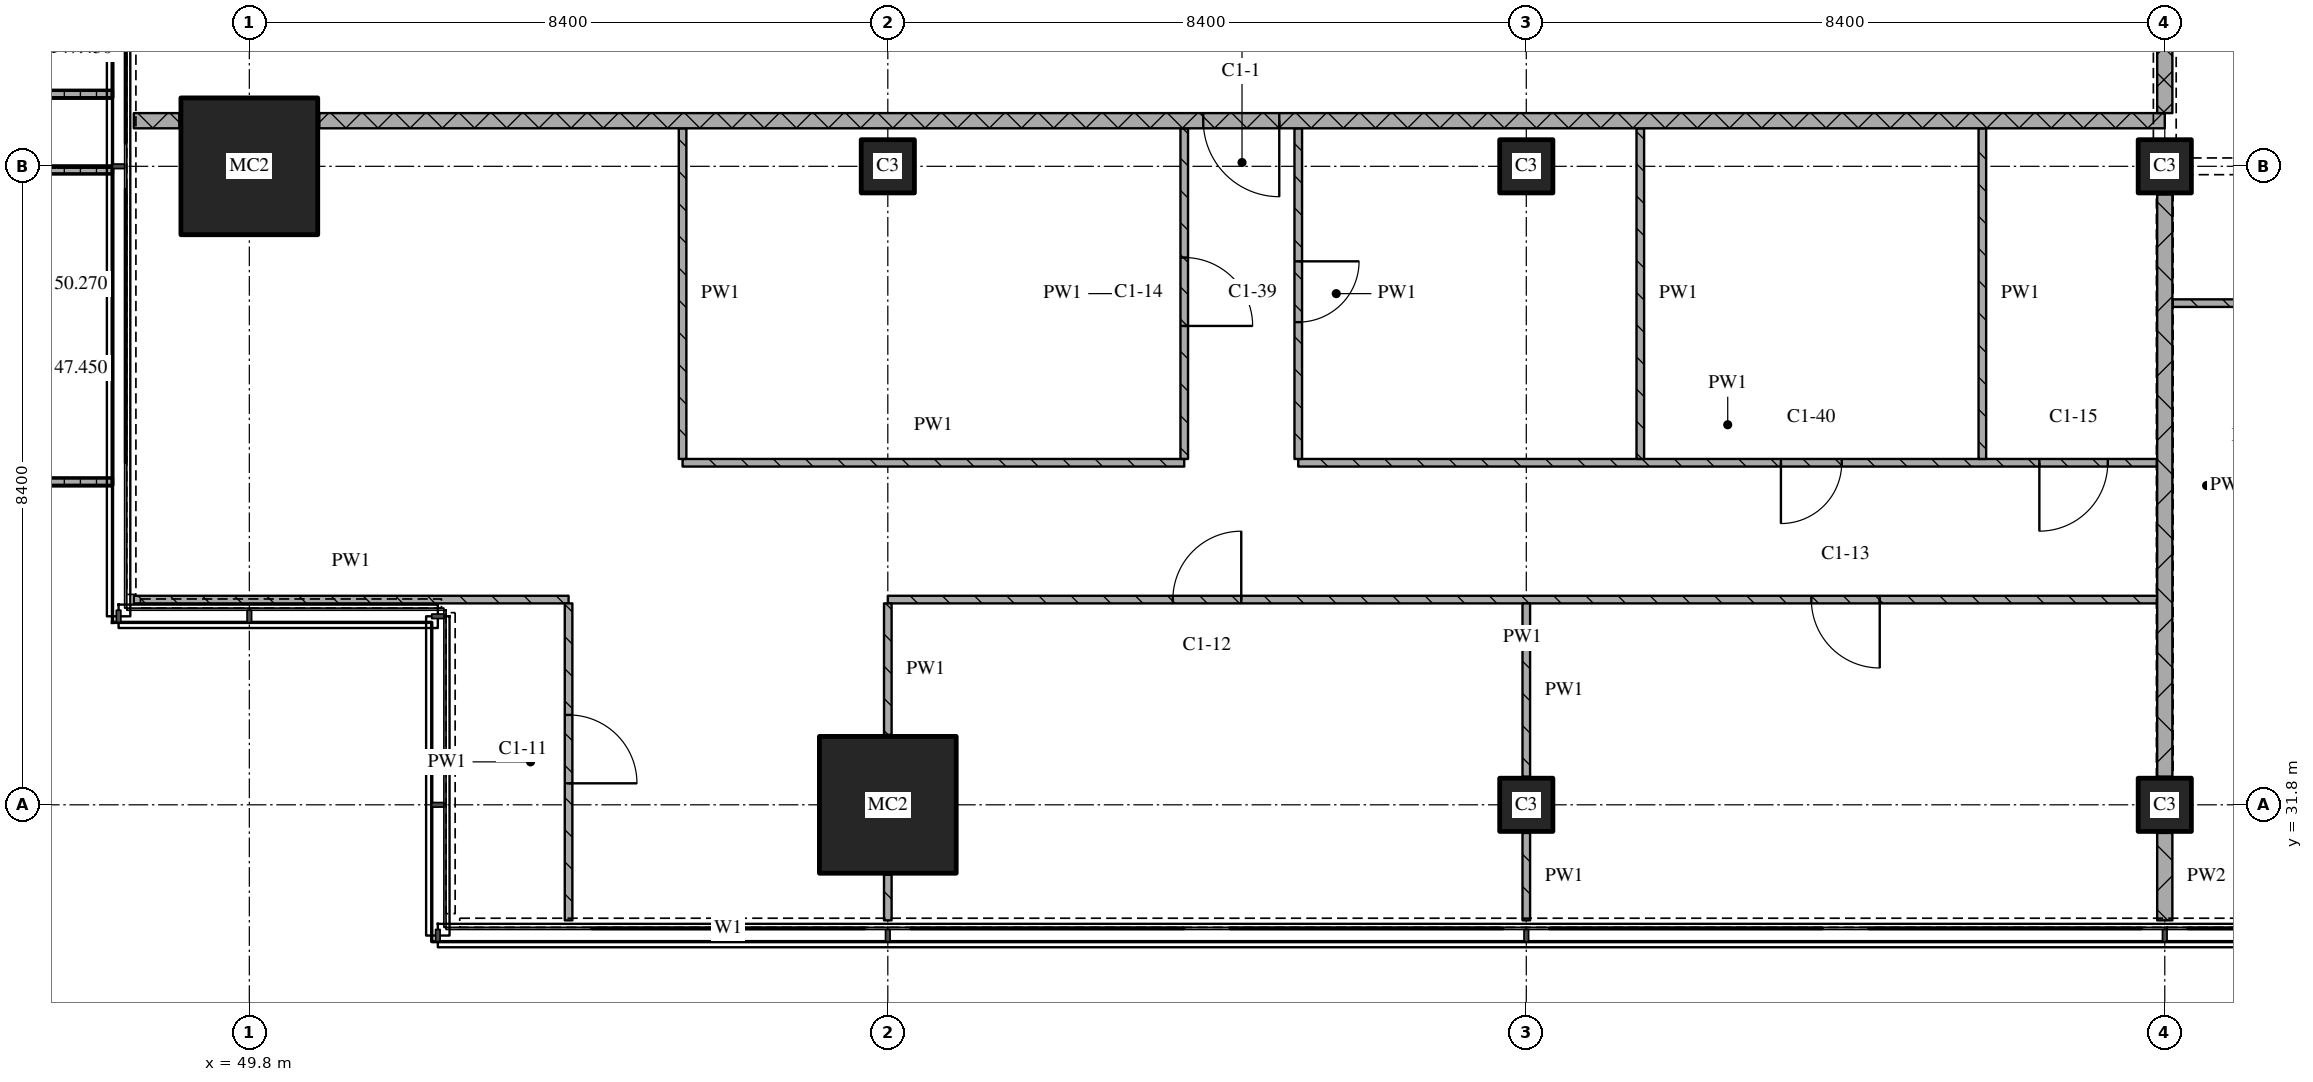
"""IFC4 building model, lengths in metres.
Left out: names, types, materials, properties, quantities, classifications, styles, units other than length and angle.
Written with IfcOpenShell. Run it as: python <this file> out.ifc"""

import sys

from ifc_helpers import new_model, si_unit, direction, frame, frame_2d, origin, origin_2d, place, context, subcontext, project, spatial, polyline, rectangle, outline, extrude, element, fill, save


model = new_model("IFC4")
c1 = context("Model", 3, precision=1e-05, world=origin(), true_north=direction((0.0, 1.0)))
c2 = subcontext(c1, "Body", "Model", "MODEL_VIEW")
j1 = project(units=[si_unit("LENGTHUNIT", "METRE"), si_unit("PLANEANGLEUNIT", "RADIAN")], contexts=[c1])
p1 = place(None, origin())
s1 = spatial("IfcSite", under=j1, at=p1, CompositionType="ELEMENT")
p2 = place(p1, origin())
s2 = spatial("IfcBuilding", under=s1, at=p2, CompositionType="ELEMENT")
p3 = place(p2, frame((0.0, 0.0, 147.45)))
s3 = spatial("IfcBuildingStorey", under=s2, at=p3, CompositionType="ELEMENT", Elevation=147.45)
for number, where, z_axis, x_axis in (
    (1, (49.8, 40.2, 0.0), (0.0, 0.0, 1.0), (1.0, 0.0, 0.0)),
    (2, (58.2, 31.8, 0.0), (0.0, 0.0, 1.0), (1.0, 0.0, 0.0)),
):
    element("IfcColumn", number, at=place(p3, frame(where, z_axis=z_axis, x_axis=x_axis)), inside=s3, PredefinedType="COLUMN", context=c2, shape_type="SweptSolid", body=[
        extrude(rectangle(XDim=1.8, YDim=1.8, at=origin_2d()), origin(), (0.0, 0.0, 1.0), 3.6),
    ])
for number, where, z_axis, x_axis in (
    (3, (58.2, 40.2, 0.0), (0.0, 0.0, 1.0), (1.0, 0.0, 0.0)),
    (4, (66.6, 31.8, 0.0), (0.0, 0.0, 1.0), (1.0, 0.0, 0.0)),
    (5, (66.6, 40.2, 0.0), (0.0, 0.0, 1.0), (1.0, 0.0, 0.0)),
    (6, (75.0, 31.8, 0.0), (0.0, 0.0, 1.0), (1.0, 0.0, 0.0)),
    (7, (75.0, 40.2, 0.0), (0.0, 0.0, 1.0), (1.0, 0.0, 0.0)),
):
    element("IfcColumn", number, at=place(p3, frame(where, z_axis=z_axis, x_axis=x_axis)), inside=s3, PredefinedType="COLUMN", context=c2, shape_type="SweptSolid", body=[
        extrude(rectangle(XDim=0.7, YDim=0.7, at=origin_2d()), origin(), (0.0, 0.0, 1.0), 3.6),
    ])
p4 = place(p3, origin())
e8 = element("IfcWall", 8, at=p4, inside=s3, PredefinedType="SOLIDWALL", context=c2, shape_type="SweptSolid", body=[
    extrude(outline(polyline([(48.0, 43.5), (48.0, 43.4), (46.5, 43.4), (46.5, 41.2), (48.0, 41.2), (48.0, 41.1), (46.4, 41.1), (46.4, 43.5), (48.0, 43.5)])), origin(), (0.0, 0.0, 1.0), 1.0),
])
p5 = place(p3, origin())
e9 = element("IfcWall", 9, at=p5, inside=s3, PredefinedType="SOLIDWALL", context=c2, shape_type="SweptSolid", body=[
    extrude(outline(polyline([(48.0, 40.2), (48.0, 40.1), (46.367, 40.1), (46.367, 36.1), (48.0, 36.1), (48.0, 36.0), (46.267, 36.0), (46.267, 40.2), (48.0, 40.2)])), origin(), (0.0, 0.0, 1.0), 1.0),
])
p6 = place(p3, frame((48.28, 34.5, 0.0), z_axis=(0.0, 0.0, 1.0), x_axis=(1.0, 0.0, 0.0)))
e10 = element("IfcWall", 10, at=p6, inside=s3, PredefinedType="PARTITIONING", context=c2, shape_type="SweptSolid", body=[
    extrude(rectangle(XDim=5.72, YDim=0.1, at=frame_2d((2.86, 0.0))), origin(), (0.0, 0.0, 1.0), 3.32),
])
p7 = place(p3, frame((74.9, 34.5, 0.0), z_axis=(0.0, 0.0, 1.0), x_axis=(-1.0, 0.0, 0.0)))
e11 = element("IfcWall", 11, at=p7, inside=s3, PredefinedType="PARTITIONING", context=c2, shape_type="SweptSolid", body=[
    extrude(rectangle(XDim=16.7, YDim=0.1, at=frame_2d((8.35, 0.0))), origin(), (0.0, 0.0, 1.0), 3.32),
])
p8 = place(p7, frame((3.65, 0.0, 0.0)))
e12 = element("IfcOpeningElement", 12, at=p8, cuts=e11, PredefinedType="OPENING", context=c2, shape_type="SweptSolid", body=[
    extrude(rectangle(XDim=0.9, YDim=2.1, at=frame_2d((0.45, 1.05))), frame((0.0, 0.06, 0.0), z_axis=(0.0, -1.0, 0.0), x_axis=(1.0, 0.0, 0.0)), (0.0, 0.0, 1.0), 0.12),
])
p9 = place(p7, frame((12.05, 0.0, 0.0)))
e13 = element("IfcOpeningElement", 13, at=p9, cuts=e11, PredefinedType="OPENING", context=c2, shape_type="SweptSolid", body=[
    extrude(rectangle(XDim=0.9, YDim=2.1, at=frame_2d((0.45, 1.05))), frame((0.0, 0.06, 0.0), z_axis=(0.0, -1.0, 0.0), x_axis=(1.0, 0.0, 0.0)), (0.0, 0.0, 1.0), 0.12),
])
p10 = place(p3, frame((55.5, 36.3, 0.0), z_axis=(0.0, 0.0, 1.0), x_axis=(1.0, 0.0, 0.0)))
e14 = element("IfcWall", 14, at=p10, inside=s3, PredefinedType="PARTITIONING", context=c2, shape_type="SweptSolid", body=[
    extrude(rectangle(XDim=6.6, YDim=0.1, at=frame_2d((3.3, 0.0))), origin(), (0.0, 0.0, 1.0), 3.32),
])
p11 = place(p3, frame((63.6, 36.3, 0.0), z_axis=(0.0, 0.0, 1.0), x_axis=(1.0, 0.0, 0.0)))
e15 = element("IfcWall", 15, at=p11, inside=s3, PredefinedType="PARTITIONING", context=c2, shape_type="SweptSolid", body=[
    extrude(rectangle(XDim=11.3, YDim=0.1, at=frame_2d((5.65, 0.0))), origin(), (0.0, 0.0, 1.0), 3.32),
])
p12 = place(p11, frame((6.35, 0.0, 0.0)))
e16 = element("IfcOpeningElement", 16, at=p12, cuts=e15, PredefinedType="OPENING", context=c2, shape_type="SweptSolid", body=[
    extrude(rectangle(XDim=0.8, YDim=2.1, at=frame_2d((0.4, 1.05))), frame((0.0, 0.06, 0.0), z_axis=(0.0, -1.0, 0.0), x_axis=(1.0, 0.0, 0.0)), (0.0, 0.0, 1.0), 0.12),
])
p13 = place(p11, frame((9.75, 0.0, 0.0)))
e17 = element("IfcOpeningElement", 17, at=p13, cuts=e15, PredefinedType="OPENING", context=c2, shape_type="SweptSolid", body=[
    extrude(rectangle(XDim=0.9, YDim=2.1, at=frame_2d((0.45, 1.05))), frame((0.0, 0.06, 0.0), z_axis=(0.0, -1.0, 0.0), x_axis=(1.0, 0.0, 0.0)), (0.0, 0.0, 1.0), 0.12),
])
p14 = place(p3, frame((75.1, 38.4, 0.0), z_axis=(0.0, 0.0, 1.0), x_axis=(1.0, 0.0, 0.0)))
e18 = element("IfcWall", 18, at=p14, inside=s3, PredefinedType="PARTITIONING", context=c2, shape_type="SweptSolid", body=[
    extrude(rectangle(XDim=2.9, YDim=0.1, at=frame_2d((1.45, 0.0))), origin(), (0.0, 0.0, 1.0), 3.32),
])
p15 = place(p14, frame((1.0, 0.0, 0.0)))
e19 = element("IfcOpeningElement", 19, at=p15, cuts=e18, PredefinedType="OPENING", context=c2, shape_type="SweptSolid", body=[
    extrude(rectangle(XDim=0.8, YDim=2.1, at=frame_2d((0.4, 1.05))), frame((0.0, 0.06, 0.0), z_axis=(0.0, -1.0, 0.0), x_axis=(1.0, 0.0, 0.0)), (0.0, 0.0, 1.0), 0.12),
])
p16 = place(p3, frame((48.28, 40.8, 0.0), z_axis=(0.0, 0.0, 1.0), x_axis=(1.0, 0.0, 0.0)))
e20 = element("IfcWall", 20, at=p16, inside=s3, PredefinedType="PARTITIONING", context=c2, shape_type="SweptSolid", body=[
    extrude(rectangle(XDim=0.6, YDim=0.2, at=frame_2d((0.3, 0.0))), origin(), (0.0, 0.0, 1.0), 3.32),
])
p17 = place(p3, frame((75.0, 40.8, 0.0), z_axis=(0.0, 0.0, 1.0), x_axis=(-1.0, 0.0, 0.0)))
e21 = element("IfcWall", 21, at=p17, inside=s3, PredefinedType="PARTITIONING", context=c2, shape_type="SweptSolid", body=[
    extrude(rectangle(XDim=24.28, YDim=0.2, at=frame_2d((12.14, 0.0))), origin(), (0.0, 0.0, 1.0), 3.32),
])
p18 = place(p17, frame((11.65, 0.0, 0.0)))
e22 = element("IfcOpeningElement", 22, at=p18, cuts=e21, PredefinedType="OPENING", context=c2, shape_type="SweptSolid", body=[
    extrude(rectangle(XDim=1.0, YDim=2.1, at=frame_2d((0.5, 1.05))), frame((0.0, 0.11, 0.0), z_axis=(0.0, -1.0, 0.0), x_axis=(1.0, 0.0, 0.0)), (0.0, 0.0, 1.0), 0.22),
])
p19 = place(p3, frame((54.0, 30.28, 0.0), z_axis=(0.0, 0.0, 1.0), x_axis=(0.0, 1.0, 0.0)))
e23 = element("IfcWall", 23, at=p19, inside=s3, PredefinedType="PARTITIONING", context=c2, shape_type="SweptSolid", body=[
    extrude(rectangle(XDim=4.17, YDim=0.1, at=frame_2d((2.085, 0.0))), origin(), (0.0, 0.0, 1.0), 3.32),
])
p20 = place(p19, frame((1.803, 0.0, 0.0)))
e24 = element("IfcOpeningElement", 24, at=p20, cuts=e23, PredefinedType="OPENING", context=c2, shape_type="SweptSolid", body=[
    extrude(rectangle(XDim=0.9, YDim=2.1, at=frame_2d((0.45, 1.05))), frame((0.0, 0.06, 0.0), z_axis=(0.0, -1.0, 0.0), x_axis=(1.0, 0.0, 0.0)), (0.0, 0.0, 1.0), 0.12),
])
p21 = place(p3, frame((55.5, 40.7, 0.0), z_axis=(0.0, 0.0, 1.0), x_axis=(0.0, -1.0, 0.0)))
e25 = element("IfcWall", 25, at=p21, inside=s3, PredefinedType="PARTITIONING", context=c2, shape_type="SweptSolid", body=[
    extrude(rectangle(XDim=4.35, YDim=0.1, at=frame_2d((2.175, 0.0))), origin(), (0.0, 0.0, 1.0), 3.32),
])
p22 = place(p3, frame((58.2, 30.88, 0.0), z_axis=(0.0, 0.0, 1.0), x_axis=(0.0, -1.0, 0.0)))
e26 = element("IfcWall", 26, at=p22, inside=s3, PredefinedType="PARTITIONING", context=c2, shape_type="SweptSolid", body=[
    extrude(rectangle(XDim=0.6, YDim=0.1, at=frame_2d((0.3, 0.0))), origin(), (0.0, 0.0, 1.0), 3.32),
])
p23 = place(p3, frame((58.2, 34.45, 0.0), z_axis=(0.0, 0.0, 1.0), x_axis=(0.0, -1.0, 0.0)))
e27 = element("IfcWall", 27, at=p23, inside=s3, PredefinedType="PARTITIONING", context=c2, shape_type="SweptSolid", body=[
    extrude(rectangle(XDim=1.73, YDim=0.1, at=frame_2d((0.865, 0.0))), origin(), (0.0, 0.0, 1.0), 3.32),
])
p24 = place(p3, frame((62.1, 36.35, 0.0), z_axis=(0.0, 0.0, 1.0), x_axis=(0.0, 1.0, 0.0)))
e28 = element("IfcWall", 28, at=p24, inside=s3, PredefinedType="PARTITIONING", context=c2, shape_type="SweptSolid", body=[
    extrude(rectangle(XDim=4.35, YDim=0.1, at=frame_2d((2.175, 0.0))), origin(), (0.0, 0.0, 1.0), 3.32),
])
p25 = place(p24, frame((1.75, 0.0, 0.0)))
e29 = element("IfcOpeningElement", 29, at=p25, cuts=e28, PredefinedType="OPENING", context=c2, shape_type="SweptSolid", body=[
    extrude(rectangle(XDim=0.9, YDim=2.1, at=frame_2d((0.45, 1.05))), frame((0.0, 0.06, 0.0), z_axis=(0.0, -1.0, 0.0), x_axis=(1.0, 0.0, 0.0)), (0.0, 0.0, 1.0), 0.12),
])
p26 = place(p3, frame((63.6, 40.7, 0.0), z_axis=(0.0, 0.0, 1.0), x_axis=(0.0, -1.0, 0.0)))
e30 = element("IfcWall", 30, at=p26, inside=s3, PredefinedType="PARTITIONING", context=c2, shape_type="SweptSolid", body=[
    extrude(rectangle(XDim=4.35, YDim=0.1, at=frame_2d((2.175, 0.0))), origin(), (0.0, 0.0, 1.0), 3.32),
])
p27 = place(p26, frame((1.75, 0.0, 0.0)))
e31 = element("IfcOpeningElement", 31, at=p27, cuts=e30, PredefinedType="OPENING", context=c2, shape_type="SweptSolid", body=[
    extrude(rectangle(XDim=0.8, YDim=2.1, at=frame_2d((0.4, 1.05))), frame((0.0, 0.06, 0.0), z_axis=(0.0, -1.0, 0.0), x_axis=(1.0, 0.0, 0.0)), (0.0, 0.0, 1.0), 0.12),
])
p28 = place(p3, frame((66.6, 31.43, 0.0), z_axis=(0.0, 0.0, 1.0), x_axis=(0.0, -1.0, 0.0)))
e32 = element("IfcWall", 32, at=p28, inside=s3, PredefinedType="PARTITIONING", context=c2, shape_type="SweptSolid", body=[
    extrude(rectangle(XDim=1.15, YDim=0.1, at=frame_2d((0.575, 0.0))), origin(), (0.0, 0.0, 1.0), 3.32),
])
p29 = place(p3, frame((66.6, 34.45, 0.0), z_axis=(0.0, 0.0, 1.0), x_axis=(0.0, -1.0, 0.0)))
e33 = element("IfcWall", 33, at=p29, inside=s3, PredefinedType="PARTITIONING", context=c2, shape_type="SweptSolid", body=[
    extrude(rectangle(XDim=2.28, YDim=0.1, at=frame_2d((1.14, 0.0))), origin(), (0.0, 0.0, 1.0), 3.32),
])
for number, where, z_axis, x_axis in (
    (34, (68.1, 40.7, 0.0), (0.0, 0.0, 1.0), (0.0, -1.0, 0.0)),
    (35, (72.6, 40.7, 0.0), (0.0, 0.0, 1.0), (0.0, -1.0, 0.0)),
):
    element("IfcWall", number, at=place(p3, frame(where, z_axis=z_axis, x_axis=x_axis)), inside=s3, PredefinedType="PARTITIONING", context=c2, shape_type="SweptSolid", body=[
        extrude(rectangle(XDim=4.35, YDim=0.1, at=frame_2d((2.175, 0.0))), origin(), (0.0, 0.0, 1.0), 3.32),
    ])
p30 = place(p3, frame((75.0, 43.1, 0.0), z_axis=(0.0, 0.0, 1.0), x_axis=(0.0, -1.0, 0.0)))
e36 = element("IfcWall", 36, at=p30, inside=s3, PredefinedType="PARTITIONING", context=c2, shape_type="SweptSolid", body=[
    extrude(rectangle(XDim=2.2, YDim=0.2, at=frame_2d((1.1, 0.0))), origin(), (0.0, 0.0, 1.0), 2.43),
])
p31 = place(p3, frame((75.0, 31.43, 0.0), z_axis=(0.0, 0.0, 1.0), x_axis=(0.0, -1.0, 0.0)))
e37 = element("IfcWall", 37, at=p31, inside=s3, PredefinedType="PARTITIONING", context=c2, shape_type="SweptSolid", body=[
    extrude(rectangle(XDim=1.15, YDim=0.2, at=frame_2d((0.575, 0.0))), origin(), (0.0, 0.0, 1.0), 3.32),
])
p32 = place(p3, frame((75.0, 39.83, 0.0), z_axis=(0.0, 0.0, 1.0), x_axis=(0.0, -1.0, 0.0)))
e38 = element("IfcWall", 38, at=p32, inside=s3, PredefinedType="PARTITIONING", context=c2, shape_type="SweptSolid", body=[
    extrude(rectangle(XDim=7.66, YDim=0.2, at=frame_2d((3.83, 0.0))), origin(), (0.0, 0.0, 1.0), 2.72),
])
p33 = place(p8, origin())
e39 = element("IfcDoor", 39, at=p33, inside=s3, OperationType="SINGLE_SWING_LEFT", PredefinedType="DOOR", context=c2, shape_type="SweptSolid", body=[
    extrude(rectangle(XDim=0.9, YDim=2.1, at=frame_2d((0.45, 1.05))), frame((0.0, 0.025, 0.0), z_axis=(0.0, -1.0, 0.0), x_axis=(1.0, 0.0, 0.0)), (0.0, 0.0, 1.0), 0.05),
])
fill(e12, e39)
p34 = place(p9, origin())
e40 = element("IfcDoor", 40, at=p34, inside=s3, OperationType="SINGLE_SWING_RIGHT", PredefinedType="DOOR", context=c2, shape_type="SweptSolid", body=[
    extrude(rectangle(XDim=0.9, YDim=2.1, at=frame_2d((0.45, 1.05))), frame((0.0, 0.025, 0.0), z_axis=(0.0, -1.0, 0.0), x_axis=(1.0, 0.0, 0.0)), (0.0, 0.0, 1.0), 0.05),
])
fill(e13, e40)
p35 = place(p12, origin())
e41 = element("IfcDoor", 41, at=p35, inside=s3, OperationType="SINGLE_SWING_RIGHT", PredefinedType="DOOR", context=c2, shape_type="SweptSolid", body=[
    extrude(rectangle(XDim=0.8, YDim=2.1, at=frame_2d((0.4, 1.05))), frame((0.0, 0.025, 0.0), z_axis=(0.0, -1.0, 0.0), x_axis=(1.0, 0.0, 0.0)), (0.0, 0.0, 1.0), 0.05),
])
fill(e16, e41)
p36 = place(p13, origin())
e42 = element("IfcDoor", 42, at=p36, inside=s3, OperationType="SINGLE_SWING_RIGHT", PredefinedType="DOOR", context=c2, shape_type="SweptSolid", body=[
    extrude(rectangle(XDim=0.9, YDim=2.1, at=frame_2d((0.45, 1.05))), frame((0.0, 0.025, 0.0), z_axis=(0.0, -1.0, 0.0), x_axis=(1.0, 0.0, 0.0)), (0.0, 0.0, 1.0), 0.05),
])
fill(e17, e42)
p37 = place(p18, origin())
e43 = element("IfcDoor", 43, at=p37, inside=s3, OperationType="SINGLE_SWING_LEFT", PredefinedType="DOOR", context=c2, shape_type="SweptSolid", body=[
    extrude(rectangle(XDim=1.0, YDim=2.1, at=frame_2d((0.5, 1.05))), frame((0.0, 0.025, 0.0), z_axis=(0.0, -1.0, 0.0), x_axis=(1.0, 0.0, 0.0)), (0.0, 0.0, 1.0), 0.05),
])
fill(e22, e43)
p38 = place(p20, origin())
e44 = element("IfcDoor", 44, at=p38, inside=s3, OperationType="SINGLE_SWING_RIGHT", PredefinedType="DOOR", context=c2, shape_type="SweptSolid", body=[
    extrude(rectangle(XDim=0.9, YDim=2.1, at=frame_2d((0.45, 1.05))), frame((0.0, 0.025, 0.0), z_axis=(0.0, -1.0, 0.0), x_axis=(1.0, 0.0, 0.0)), (0.0, 0.0, 1.0), 0.05),
])
fill(e24, e44)
p39 = place(p25, origin())
e45 = element("IfcDoor", 45, at=p39, inside=s3, OperationType="SINGLE_SWING_RIGHT", PredefinedType="DOOR", context=c2, shape_type="SweptSolid", body=[
    extrude(rectangle(XDim=0.9, YDim=2.1, at=frame_2d((0.45, 1.05))), frame((0.0, 0.025, 0.0), z_axis=(0.0, -1.0, 0.0), x_axis=(1.0, 0.0, 0.0)), (0.0, 0.0, 1.0), 0.05),
])
fill(e29, e45)
p40 = place(p27, origin())
e46 = element("IfcDoor", 46, at=p40, inside=s3, OperationType="SINGLE_SWING_LEFT", PredefinedType="DOOR", context=c2, shape_type="SweptSolid", body=[
    extrude(rectangle(XDim=0.8, YDim=2.1, at=frame_2d((0.4, 1.05))), frame((0.0, 0.025, 0.0), z_axis=(0.0, -1.0, 0.0), x_axis=(1.0, 0.0, 0.0)), (0.0, 0.0, 1.0), 0.05),
])
fill(e31, e46)
save(model, sys.argv[1])
